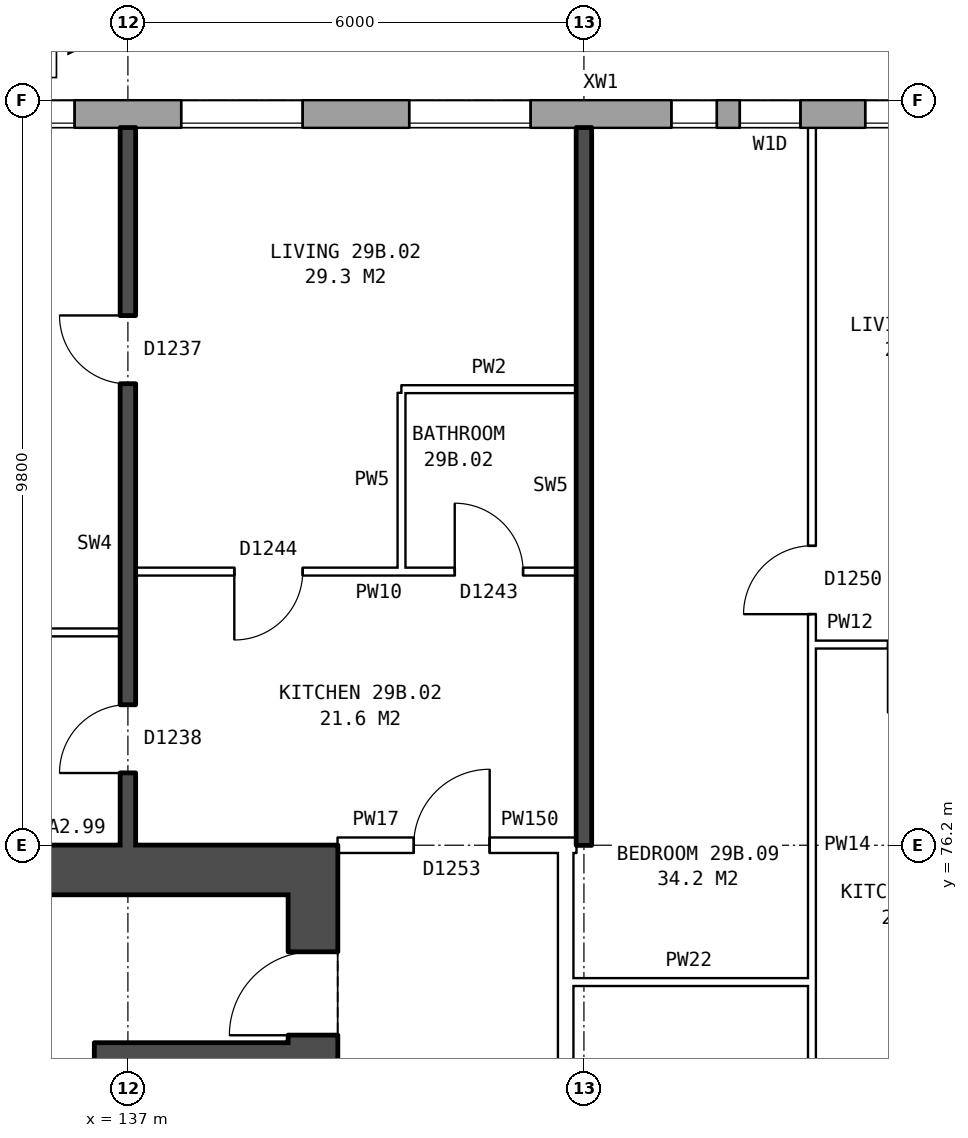
"""IFC4 building model, lengths in metres.
Left out: names, types, materials, properties, quantities, classifications, styles, units other than length and angle.
Written with IfcOpenShell. Run it as: python <this file> out.ifc"""

import sys

from ifc_helpers import new_model, si_unit, direction, frame, frame_2d, origin, place, context, subcontext, project, spatial, rectangle, extrude, element, fill, save


model = new_model("IFC4")
c1 = context("Model", 3, precision=1e-05, world=origin(), true_north=direction((0.0, 1.0)))
c2 = subcontext(c1, "Body", "Model", "MODEL_VIEW")
j1 = project(units=[si_unit("LENGTHUNIT", "METRE"), si_unit("PLANEANGLEUNIT", "RADIAN")], contexts=[c1])
p1 = place(None, origin())
s1 = spatial("IfcSite", under=j1, at=p1, CompositionType="ELEMENT")
p2 = place(p1, origin())
s2 = spatial("IfcBuilding", under=s1, at=p2, CompositionType="ELEMENT")
p3 = place(p2, frame((0.0, 0.0, 105.7)))
s3 = spatial("IfcBuildingStorey", under=s2, at=p3, CompositionType="ELEMENT", Elevation=105.7)
p4 = place(p3, frame((170.925, 85.82, 0.0), z_axis=(0.0, 0.0, 1.0), x_axis=(-1.0, 0.0, 0.0)))
e1 = element("IfcWall", 1, at=p4, inside=s3, PredefinedType="STANDARD", context=c2, shape_type="SweptSolid", body=[
    extrude(rectangle(XDim=36.851, YDim=0.36, at=frame_2d((18.425, 0.0))), origin(), (0.0, 0.0, 1.0), 2.85),
])
p5 = place(p4, frame((1.625, 0.0, 0.8)))
e2 = element("IfcOpeningElement", 2, at=p5, cuts=e1, PredefinedType="OPENING", context=c2, shape_type="SweptSolid", body=[
    extrude(rectangle(XDim=1.6, YDim=1.8, at=frame_2d((0.8, 0.9))), frame((0.0, 0.19, 0.0), z_axis=(0.0, -1.0, 0.0), x_axis=(1.0, 0.0, 0.0)), (0.0, 0.0, 1.0), 0.38),
])
p6 = place(p4, frame((4.625, 0.0, 0.8)))
e3 = element("IfcOpeningElement", 3, at=p6, cuts=e1, PredefinedType="OPENING", context=c2, shape_type="SweptSolid", body=[
    extrude(rectangle(XDim=1.6, YDim=1.8, at=frame_2d((0.8, 0.9))), frame((0.0, 0.19, 0.0), z_axis=(0.0, -1.0, 0.0), x_axis=(1.0, 0.0, 0.0)), (0.0, 0.0, 1.0), 0.38),
])
p7 = place(p4, frame((6.525, 0.0, 0.8)))
e4 = element("IfcOpeningElement", 4, at=p7, cuts=e1, PredefinedType="OPENING", context=c2, shape_type="SweptSolid", body=[
    extrude(rectangle(XDim=1.4, YDim=1.8, at=frame_2d((0.7, 0.9))), frame((0.0, 0.19, 0.0), z_axis=(0.0, -1.0, 0.0), x_axis=(1.0, 0.0, 0.0)), (0.0, 0.0, 1.0), 0.38),
])
p8 = place(p4, frame((10.675, 0.0, 0.8)))
e5 = element("IfcOpeningElement", 5, at=p8, cuts=e1, PredefinedType="OPENING", context=c2, shape_type="SweptSolid", body=[
    extrude(rectangle(XDim=0.6, YDim=0.9, at=frame_2d((0.3, 0.45))), frame((0.0, 0.19, 0.0), z_axis=(0.0, -1.0, 0.0), x_axis=(1.0, 0.0, 0.0)), (0.0, 0.0, 1.0), 0.38),
])
p9 = place(p4, frame((13.625, 0.0, 0.8)))
e6 = element("IfcOpeningElement", 6, at=p9, cuts=e1, PredefinedType="OPENING", context=c2, shape_type="SweptSolid", body=[
    extrude(rectangle(XDim=1.6, YDim=1.8, at=frame_2d((0.8, 0.9))), frame((0.0, 0.19, 0.0), z_axis=(0.0, -1.0, 0.0), x_axis=(1.0, 0.0, 0.0)), (0.0, 0.0, 1.0), 0.38),
])
p10 = place(p4, frame((16.625, 0.0, 0.8)))
e7 = element("IfcOpeningElement", 7, at=p10, cuts=e1, PredefinedType="OPENING", context=c2, shape_type="SweptSolid", body=[
    extrude(rectangle(XDim=1.6, YDim=1.8, at=frame_2d((0.8, 0.9))), frame((0.0, 0.19, 0.0), z_axis=(0.0, -1.0, 0.0), x_axis=(1.0, 0.0, 0.0)), (0.0, 0.0, 1.0), 0.38),
])
p11 = place(p4, frame((19.625, 0.0, 0.8)))
e8 = element("IfcOpeningElement", 8, at=p11, cuts=e1, PredefinedType="OPENING", context=c2, shape_type="SweptSolid", body=[
    extrude(rectangle(XDim=1.6, YDim=1.8, at=frame_2d((0.8, 0.9))), frame((0.0, 0.19, 0.0), z_axis=(0.0, -1.0, 0.0), x_axis=(1.0, 0.0, 0.0)), (0.0, 0.0, 1.0), 0.38),
])
p12 = place(p4, frame((22.625, 0.0, 0.8)))
e9 = element("IfcOpeningElement", 9, at=p12, cuts=e1, PredefinedType="OPENING", context=c2, shape_type="SweptSolid", body=[
    extrude(rectangle(XDim=1.6, YDim=1.8, at=frame_2d((0.8, 0.9))), frame((0.0, 0.19, 0.0), z_axis=(0.0, -1.0, 0.0), x_axis=(1.0, 0.0, 0.0)), (0.0, 0.0, 1.0), 0.38),
])
p13 = place(p4, frame((25.075, 0.0, 0.15)))
e10 = element("IfcOpeningElement", 10, at=p13, cuts=e1, PredefinedType="OPENING", context=c2, shape_type="SweptSolid", body=[
    extrude(rectangle(XDim=0.8, YDim=1.8, at=frame_2d((0.4, 0.9))), frame((0.0, 0.19, 0.0), z_axis=(0.0, -1.0, 0.0), x_axis=(1.0, 0.0, 0.0)), (0.0, 0.0, 1.0), 0.38),
])
p14 = place(p4, frame((28.625, 0.0, 0.8)))
e11 = element("IfcOpeningElement", 11, at=p14, cuts=e1, PredefinedType="OPENING", context=c2, shape_type="SweptSolid", body=[
    extrude(rectangle(XDim=1.6, YDim=1.8, at=frame_2d((0.8, 0.9))), frame((0.0, 0.19, 0.0), z_axis=(0.0, -1.0, 0.0), x_axis=(1.0, 0.0, 0.0)), (0.0, 0.0, 1.0), 0.38),
])
p15 = place(p4, frame((31.625, 0.0, 0.8)))
e12 = element("IfcOpeningElement", 12, at=p15, cuts=e1, PredefinedType="OPENING", context=c2, shape_type="SweptSolid", body=[
    extrude(rectangle(XDim=1.6, YDim=1.8, at=frame_2d((0.8, 0.9))), frame((0.0, 0.19, 0.0), z_axis=(0.0, -1.0, 0.0), x_axis=(1.0, 0.0, 0.0)), (0.0, 0.0, 1.0), 0.38),
])
p16 = place(p4, frame((34.625, 0.0, 0.8)))
e13 = element("IfcOpeningElement", 13, at=p16, cuts=e1, PredefinedType="OPENING", context=c2, shape_type="SweptSolid", body=[
    extrude(rectangle(XDim=1.6, YDim=1.8, at=frame_2d((0.8, 0.9))), frame((0.0, 0.19, 0.0), z_axis=(0.0, -1.0, 0.0), x_axis=(1.0, 0.0, 0.0)), (0.0, 0.0, 1.0), 0.38),
])
p17 = place(p4, frame((8.225, 0.0, 1.4)))
e14 = element("IfcOpeningElement", 14, at=p17, cuts=e1, PredefinedType="OPENING", context=c2, shape_type="SweptSolid", body=[
    extrude(rectangle(XDim=1.0, YDim=1.2, at=frame_2d((0.5, 0.6))), frame((0.0, 0.19, 0.0), z_axis=(0.0, -1.0, 0.0), x_axis=(1.0, 0.0, 0.0)), (0.0, 0.0, 1.0), 0.38),
])
p18 = place(p4, frame((11.725, 0.0, 0.8)))
e15 = element("IfcOpeningElement", 15, at=p18, cuts=e1, PredefinedType="OPENING", context=c2, shape_type="SweptSolid", body=[
    extrude(rectangle(XDim=1.6, YDim=1.8, at=frame_2d((0.8, 0.9))), frame((0.0, 0.19, 0.0), z_axis=(0.0, -1.0, 0.0), x_axis=(1.0, 0.0, 0.0)), (0.0, 0.0, 1.0), 0.38),
])
p19 = place(p4, frame((26.175, 0.0, 0.25)))
e16 = element("IfcOpeningElement", 16, at=p19, cuts=e1, PredefinedType="OPENING", context=c2, shape_type="SweptSolid", body=[
    extrude(rectangle(XDim=0.6, YDim=0.9, at=frame_2d((0.3, 0.45))), frame((0.0, 0.19, 0.0), z_axis=(0.0, -1.0, 0.0), x_axis=(1.0, 0.0, 0.0)), (0.0, 0.0, 1.0), 0.38),
])
p20 = place(p3, frame((139.435, 64.45, 0.0), z_axis=(0.0, 0.0, 1.0), x_axis=(0.0, 1.0, 0.0)))
e17 = element("IfcWall", 17, at=p20, inside=s3, PredefinedType="SHEAR", context=c2, shape_type="SweptSolid", body=[
    extrude(rectangle(XDim=11.1, YDim=0.65, at=frame_2d((5.55, 0.0))), origin(), (0.0, 0.0, 1.0), 2.85),
])
p21 = place(p20, frame((0.675, 0.0, 0.0)))
e18 = element("IfcOpeningElement", 18, at=p21, cuts=e17, PredefinedType="OPENING", context=c2, shape_type="SweptSolid", body=[
    extrude(rectangle(XDim=1.1, YDim=2.1, at=frame_2d((0.55, 1.05))), frame((0.0, 0.335, 0.0), z_axis=(0.0, -1.0, 0.0), x_axis=(1.0, 0.0, 0.0)), (0.0, 0.0, 1.0), 0.67),
])
p22 = place(p20, frame((9.25, 0.0, 0.0)))
e19 = element("IfcOpeningElement", 19, at=p22, cuts=e17, PredefinedType="OPENING", context=c2, shape_type="SweptSolid", body=[
    extrude(rectangle(XDim=1.1, YDim=2.1, at=frame_2d((0.55, 1.05))), frame((0.0, 0.335, 0.0), z_axis=(0.0, -1.0, 0.0), x_axis=(1.0, 0.0, 0.0)), (0.0, 0.0, 1.0), 0.67),
])
p23 = place(p20, frame((7.475, 0.0, 0.0)))
e20 = element("IfcOpeningElement", 20, at=p23, cuts=e17, PredefinedType="OPENING", context=c2, shape_type="SweptSolid", body=[
    extrude(rectangle(XDim=0.85, YDim=2.1, at=frame_2d((0.425, 1.05))), frame((0.0, 0.335, 0.0), z_axis=(0.0, -1.0, 0.0), x_axis=(1.0, 0.0, 0.0)), (0.0, 0.0, 1.0), 0.67),
])
p24 = place(p3, frame((139.76, 75.875, 0.0), z_axis=(0.0, 0.0, 1.0), x_axis=(-1.0, 0.0, 0.0)))
e21 = element("IfcWall", 21, at=p24, inside=s3, PredefinedType="SHEAR", context=c2, shape_type="SweptSolid", body=[
    extrude(rectangle(XDim=8.4, YDim=0.65, at=frame_2d((4.2, 0.0))), origin(), (0.0, 0.0, 1.0), 2.85),
])
p25 = place(p3, frame((139.11, 73.45, 0.0), z_axis=(0.0, 0.0, 1.0), x_axis=(-1.0, 0.0, 0.0)))
e22 = element("IfcWall", 22, at=p25, inside=s3, PredefinedType="SHEAR", context=c2, shape_type="SweptSolid", body=[
    extrude(rectangle(XDim=2.25, YDim=0.3, at=frame_2d((1.125, 0.0))), origin(), (0.0, 0.0, 1.0), 2.85),
])
p26 = place(p3, frame((136.71, 71.4, 0.0), z_axis=(0.0, 0.0, 1.0), x_axis=(0.0, 1.0, 0.0)))
e23 = element("IfcWall", 23, at=p26, inside=s3, PredefinedType="SHEAR", context=c2, shape_type="SweptSolid", body=[
    extrude(rectangle(XDim=2.2, YDim=0.3, at=frame_2d((1.1, 0.0))), origin(), (0.0, 0.0, 1.0), 2.85),
])
p27 = place(p3, frame((142.76, 63.9, 0.0), z_axis=(0.0, 0.0, 1.0), x_axis=(0.0, 1.0, 0.0)))
e24 = element("IfcWall", 24, at=p27, inside=s3, PredefinedType="PARTITIONING", context=c2, shape_type="SweptSolid", body=[
    extrude(rectangle(XDim=12.2, YDim=0.2, at=frame_2d((6.1, 0.0))), origin(), (0.0, 0.0, 1.0), 2.85),
])
p28 = place(p27, frame((5.1, 0.0, 0.0)))
e25 = element("IfcOpeningElement", 25, at=p28, cuts=e24, PredefinedType="OPENING", context=c2, shape_type="SweptSolid", body=[
    extrude(rectangle(XDim=2.0, YDim=2.1, at=frame_2d((1.0, 1.05))), frame((0.0, 0.11, 0.0), z_axis=(0.0, -1.0, 0.0), x_axis=(1.0, 0.0, 0.0)), (0.0, 0.0, 1.0), 0.22),
])
p29 = place(p3, frame((142.76, 74.4, 0.0), z_axis=(0.0, 0.0, 1.0), x_axis=(1.0, 0.0, 0.0)))
e26 = element("IfcWall", 26, at=p29, inside=s3, PredefinedType="PARTITIONING", context=c2, shape_type="SweptSolid", body=[
    extrude(rectangle(XDim=3.24, YDim=0.1, at=frame_2d((1.62, 0.0))), origin(), (0.0, 0.0, 1.0), 2.85),
])
p30 = place(p3, frame((139.76, 76.2, 0.0), z_axis=(0.0, 0.0, 1.0), x_axis=(1.0, 0.0, 0.0)))
e27 = element("IfcWall", 27, at=p30, inside=s3, PredefinedType="PARTITIONING", context=c2, shape_type="SweptSolid", body=[
    extrude(rectangle(XDim=3.0, YDim=0.2, at=frame_2d((1.5, 0.0))), origin(), (0.0, 0.0, 1.0), 2.85),
])
p31 = place(p30, frame((1.0, 0.0, 0.0)))
e28 = element("IfcOpeningElement", 28, at=p31, cuts=e27, PredefinedType="OPENING", context=c2, shape_type="SweptSolid", body=[
    extrude(rectangle(XDim=1.0, YDim=2.1, at=frame_2d((0.5, 1.05))), frame((0.0, 0.11, 0.0), z_axis=(0.0, -1.0, 0.0), x_axis=(1.0, 0.0, 0.0)), (0.0, 0.0, 1.0), 0.22),
])
p32 = place(p3, frame((142.76, 76.2, 0.0), z_axis=(0.0, 0.0, 1.0), x_axis=(1.0, 0.0, 0.0)))
e29 = element("IfcWall", 29, at=p32, inside=s3, PredefinedType="PARTITIONING", context=c2, shape_type="SweptSolid", body=[
    extrude(rectangle(XDim=0.14, YDim=0.2, at=frame_2d((0.07, 0.0))), origin(), (0.0, 0.0, 1.0), 2.85),
])
p33 = place(p3, frame((146.0, 78.84, 0.0), z_axis=(0.0, 0.0, 1.0), x_axis=(1.0, 0.0, 0.0)))
e30 = element("IfcWall", 30, at=p33, inside=s3, PredefinedType="PARTITIONING", context=c2, shape_type="SweptSolid", body=[
    extrude(rectangle(XDim=2.9, YDim=0.1, at=frame_2d((1.45, 0.0))), origin(), (0.0, 0.0, 1.0), 2.85),
])
p34 = place(p33, frame((1.0, 0.0, 0.0)))
e31 = element("IfcOpeningElement", 31, at=p34, cuts=e30, PredefinedType="OPENING", context=c2, shape_type="SweptSolid", body=[
    extrude(rectangle(XDim=0.9, YDim=2.1, at=frame_2d((0.45, 1.05))), frame((0.0, 0.06, 0.0), z_axis=(0.0, -1.0, 0.0), x_axis=(1.0, 0.0, 0.0)), (0.0, 0.0, 1.0), 0.12),
])
p35 = place(p3, frame((131.36, 79.0, 0.0), z_axis=(0.0, 0.0, 1.0), x_axis=(1.0, 0.0, 0.0)))
e32 = element("IfcWall", 32, at=p35, inside=s3, PredefinedType="PARTITIONING", context=c2, shape_type="SweptSolid", body=[
    extrude(rectangle(XDim=5.54, YDim=0.1, at=frame_2d((2.77, 0.0))), origin(), (0.0, 0.0, 1.0), 2.85),
])
p36 = place(p3, frame((137.1, 79.8, 0.0), z_axis=(0.0, 0.0, 1.0), x_axis=(1.0, 0.0, 0.0)))
e33 = element("IfcWall", 33, at=p36, inside=s3, PredefinedType="PARTITIONING", context=c2, shape_type="SweptSolid", body=[
    extrude(rectangle(XDim=5.8, YDim=0.1, at=frame_2d((2.9, 0.0))), origin(), (0.0, 0.0, 1.0), 2.85),
])
p37 = place(p36, frame((1.3, 0.0, 0.0)))
e34 = element("IfcOpeningElement", 34, at=p37, cuts=e33, PredefinedType="OPENING", context=c2, shape_type="SweptSolid", body=[
    extrude(rectangle(XDim=0.9, YDim=2.1, at=frame_2d((0.45, 1.05))), frame((0.0, 0.06, 0.0), z_axis=(0.0, -1.0, 0.0), x_axis=(1.0, 0.0, 0.0)), (0.0, 0.0, 1.0), 0.12),
])
p38 = place(p36, frame((4.2, 0.0, 0.0)))
e35 = element("IfcOpeningElement", 35, at=p38, cuts=e33, PredefinedType="OPENING", context=c2, shape_type="SweptSolid", body=[
    extrude(rectangle(XDim=0.9, YDim=2.1, at=frame_2d((0.45, 1.05))), frame((0.0, 0.06, 0.0), z_axis=(0.0, -1.0, 0.0), x_axis=(1.0, 0.0, 0.0)), (0.0, 0.0, 1.0), 0.12),
])
p39 = place(p3, frame((140.6, 82.2, 0.0), z_axis=(0.0, 0.0, 1.0), x_axis=(1.0, 0.0, 0.0)))
e36 = element("IfcWall", 36, at=p39, inside=s3, PredefinedType="PARTITIONING", context=c2, shape_type="SweptSolid", body=[
    extrude(rectangle(XDim=2.3, YDim=0.1, at=frame_2d((1.15, 0.0))), origin(), (0.0, 0.0, 1.0), 2.85),
])
p40 = place(p3, frame((137.0, 76.2, 0.0), z_axis=(0.0, 0.0, 1.0), x_axis=(0.0, 1.0, 0.0)))
e37 = element("IfcWall", 37, at=p40, inside=s3, PredefinedType="SOLIDWALL", context=c2, shape_type="SweptSolid", body=[
    extrude(rectangle(XDim=9.44, YDim=0.2, at=frame_2d((4.72, 0.0))), origin(), (0.0, 0.0, 1.0), 2.85),
])
p41 = place(p40, frame((6.07, 0.0, 0.0)))
e38 = element("IfcOpeningElement", 38, at=p41, cuts=e37, PredefinedType="OPENING", context=c2, shape_type="SweptSolid", body=[
    extrude(rectangle(XDim=0.9, YDim=2.1, at=frame_2d((0.45, 1.05))), frame((0.0, 0.11, 0.0), z_axis=(0.0, -1.0, 0.0), x_axis=(1.0, 0.0, 0.0)), (0.0, 0.0, 1.0), 0.22),
])
p42 = place(p40, frame((0.95, 0.0, 0.0)))
e39 = element("IfcOpeningElement", 39, at=p42, cuts=e37, PredefinedType="OPENING", context=c2, shape_type="SweptSolid", body=[
    extrude(rectangle(XDim=0.9, YDim=2.1, at=frame_2d((0.45, 1.05))), frame((0.0, 0.11, 0.0), z_axis=(0.0, -1.0, 0.0), x_axis=(1.0, 0.0, 0.0)), (0.0, 0.0, 1.0), 0.22),
])
p43 = place(p3, frame((140.6, 79.85, 0.0), z_axis=(0.0, 0.0, 1.0), x_axis=(0.0, 1.0, 0.0)))
e40 = element("IfcWall", 40, at=p43, inside=s3, PredefinedType="PARTITIONING", context=c2, shape_type="SweptSolid", body=[
    extrude(rectangle(XDim=2.3, YDim=0.1, at=frame_2d((1.15, 0.0))), origin(), (0.0, 0.0, 1.0), 2.85),
])
p44 = place(p3, frame((143.0, 76.2, 0.0), z_axis=(0.0, 0.0, 1.0), x_axis=(0.0, 1.0, 0.0)))
e41 = element("IfcWall", 41, at=p44, inside=s3, PredefinedType="SOLIDWALL", context=c2, shape_type="SweptSolid", body=[
    extrude(rectangle(XDim=9.44, YDim=0.2, at=frame_2d((4.72, 0.0))), origin(), (0.0, 0.0, 1.0), 2.85),
])
p45 = place(p3, frame((146.0, 71.3, 0.0), z_axis=(0.0, 0.0, 1.0), x_axis=(0.0, 1.0, 0.0)))
e42 = element("IfcWall", 42, at=p45, inside=s3, PredefinedType="PARTITIONING", context=c2, shape_type="SweptSolid", body=[
    extrude(rectangle(XDim=14.34, YDim=0.1, at=frame_2d((7.17, 0.0))), origin(), (0.0, 0.0, 1.0), 2.85),
])
p46 = place(p45, frame((7.94, 0.0, 0.0)))
e43 = element("IfcOpeningElement", 43, at=p46, cuts=e42, PredefinedType="OPENING", context=c2, shape_type="SweptSolid", body=[
    extrude(rectangle(XDim=0.9, YDim=2.1, at=frame_2d((0.45, 1.05))), frame((0.0, 0.06, 0.0), z_axis=(0.0, -1.0, 0.0), x_axis=(1.0, 0.0, 0.0)), (0.0, 0.0, 1.0), 0.12),
])
p47 = place(p45, frame((0.4, 0.0, 0.0)))
e44 = element("IfcOpeningElement", 44, at=p47, cuts=e42, PredefinedType="OPENING", context=c2, shape_type="SweptSolid", body=[
    extrude(rectangle(XDim=0.9, YDim=2.1, at=frame_2d((0.45, 1.05))), frame((0.0, 0.06, 0.0), z_axis=(0.0, -1.0, 0.0), x_axis=(1.0, 0.0, 0.0)), (0.0, 0.0, 1.0), 0.12),
])
p48 = place(p12, origin())
e45 = element("IfcWindow", 45, at=p48, inside=s3, PartitioningType="SINGLE_PANEL", PredefinedType="WINDOW", context=c2, shape_type="SweptSolid", body=[
    extrude(rectangle(XDim=1.6, YDim=1.8, at=frame_2d((0.8, 0.9))), frame((0.0, 0.15, 0.0), z_axis=(0.0, -1.0, 0.0), x_axis=(1.0, 0.0, 0.0)), (0.0, 0.0, 1.0), 0.06),
])
fill(e9, e45)
p49 = place(p13, origin())
e46 = element("IfcWindow", 46, at=p49, inside=s3, PartitioningType="SINGLE_PANEL", PredefinedType="WINDOW", context=c2, shape_type="SweptSolid", body=[
    extrude(rectangle(XDim=0.8, YDim=1.8, at=frame_2d((0.4, 0.9))), frame((0.0, 0.15, 0.0), z_axis=(0.0, -1.0, 0.0), x_axis=(1.0, 0.0, 0.0)), (0.0, 0.0, 1.0), 0.06),
])
fill(e10, e46)
p50 = place(p14, origin())
e47 = element("IfcWindow", 47, at=p50, inside=s3, PartitioningType="SINGLE_PANEL", PredefinedType="WINDOW", context=c2, shape_type="SweptSolid", body=[
    extrude(rectangle(XDim=1.6, YDim=1.8, at=frame_2d((0.8, 0.9))), frame((0.0, 0.15, 0.0), z_axis=(0.0, -1.0, 0.0), x_axis=(1.0, 0.0, 0.0)), (0.0, 0.0, 1.0), 0.06),
])
fill(e11, e47)
p51 = place(p15, origin())
e48 = element("IfcWindow", 48, at=p51, inside=s3, PartitioningType="SINGLE_PANEL", PredefinedType="WINDOW", context=c2, shape_type="SweptSolid", body=[
    extrude(rectangle(XDim=1.6, YDim=1.8, at=frame_2d((0.8, 0.9))), frame((0.0, 0.15, 0.0), z_axis=(0.0, -1.0, 0.0), x_axis=(1.0, 0.0, 0.0)), (0.0, 0.0, 1.0), 0.06),
])
fill(e12, e48)
p52 = place(p16, origin())
e49 = element("IfcWindow", 49, at=p52, inside=s3, PartitioningType="SINGLE_PANEL", PredefinedType="WINDOW", context=c2, shape_type="SweptSolid", body=[
    extrude(rectangle(XDim=1.6, YDim=1.8, at=frame_2d((0.8, 0.9))), frame((0.0, 0.15, 0.0), z_axis=(0.0, -1.0, 0.0), x_axis=(1.0, 0.0, 0.0)), (0.0, 0.0, 1.0), 0.06),
])
fill(e13, e49)
p53 = place(p22, origin())
e50 = element("IfcDoor", 50, at=p53, inside=s3, OperationType="SINGLE_SWING_LEFT", PredefinedType="DOOR", context=c2, shape_type="SweptSolid", body=[
    extrude(rectangle(XDim=1.1, YDim=2.1, at=frame_2d((0.55, 1.05))), frame((0.0, 0.31, 0.0), z_axis=(0.0, -1.0, 0.0), x_axis=(1.0, 0.0, 0.0)), (0.0, 0.0, 1.0), 0.05),
])
fill(e19, e50)
p54 = place(p41, origin())
e51 = element("IfcDoor", 51, at=p54, inside=s3, OperationType="SINGLE_SWING_RIGHT", PredefinedType="DOOR", context=c2, shape_type="SweptSolid", body=[
    extrude(rectangle(XDim=0.9, YDim=2.1, at=frame_2d((0.45, 1.05))), frame((0.0, 0.025, 0.0), z_axis=(0.0, -1.0, 0.0), x_axis=(1.0, 0.0, 0.0)), (0.0, 0.0, 1.0), 0.05),
])
fill(e38, e51)
p55 = place(p42, origin())
e52 = element("IfcDoor", 52, at=p55, inside=s3, OperationType="SINGLE_SWING_LEFT", PredefinedType="DOOR", context=c2, shape_type="SweptSolid", body=[
    extrude(rectangle(XDim=0.9, YDim=2.1, at=frame_2d((0.45, 1.05))), frame((0.0, 0.025, 0.0), z_axis=(0.0, -1.0, 0.0), x_axis=(1.0, 0.0, 0.0)), (0.0, 0.0, 1.0), 0.05),
])
fill(e39, e52)
p56 = place(p31, origin())
e53 = element("IfcDoor", 53, at=p56, inside=s3, OperationType="SINGLE_SWING_RIGHT", PredefinedType="DOOR", context=c2, shape_type="SweptSolid", body=[
    extrude(rectangle(XDim=1.0, YDim=2.1, at=frame_2d((0.5, 1.05))), frame((0.0, 0.025, 0.0), z_axis=(0.0, -1.0, 0.0), x_axis=(1.0, 0.0, 0.0)), (0.0, 0.0, 1.0), 0.05),
])
fill(e28, e53)
p57 = place(p37, frame((0.9, 0.0, 0.0), z_axis=(0.0, 0.0, 1.0), x_axis=(-1.0, 0.0, 0.0)))
e54 = element("IfcDoor", 54, at=p57, inside=s3, OperationType="SINGLE_SWING_RIGHT", PredefinedType="DOOR", context=c2, shape_type="SweptSolid", body=[
    extrude(rectangle(XDim=0.9, YDim=2.1, at=frame_2d((0.45, 1.05))), frame((0.0, 0.025, 0.0), z_axis=(0.0, -1.0, 0.0), x_axis=(1.0, 0.0, 0.0)), (0.0, 0.0, 1.0), 0.05),
])
fill(e34, e54)
p58 = place(p38, origin())
e55 = element("IfcDoor", 55, at=p58, inside=s3, OperationType="SINGLE_SWING_LEFT", PredefinedType="DOOR", context=c2, shape_type="SweptSolid", body=[
    extrude(rectangle(XDim=0.9, YDim=2.1, at=frame_2d((0.45, 1.05))), frame((0.0, 0.025, 0.0), z_axis=(0.0, -1.0, 0.0), x_axis=(1.0, 0.0, 0.0)), (0.0, 0.0, 1.0), 0.05),
])
fill(e35, e55)
p59 = place(p46, origin())
e56 = element("IfcDoor", 56, at=p59, inside=s3, OperationType="SINGLE_SWING_LEFT", PredefinedType="DOOR", context=c2, shape_type="SweptSolid", body=[
    extrude(rectangle(XDim=0.9, YDim=2.1, at=frame_2d((0.45, 1.05))), frame((0.0, 0.025, 0.0), z_axis=(0.0, -1.0, 0.0), x_axis=(1.0, 0.0, 0.0)), (0.0, 0.0, 1.0), 0.05),
])
fill(e43, e56)
p60 = place(p19, origin())
e57 = element("IfcWindow", 57, at=p60, inside=s3, PartitioningType="SINGLE_PANEL", PredefinedType="WINDOW", context=c2, shape_type="SweptSolid", body=[
    extrude(rectangle(XDim=0.6, YDim=0.9, at=frame_2d((0.3, 0.45))), frame((0.0, 0.15, 0.0), z_axis=(0.0, -1.0, 0.0), x_axis=(1.0, 0.0, 0.0)), (0.0, 0.0, 1.0), 0.06),
])
fill(e16, e57)
save(model, sys.argv[1])
